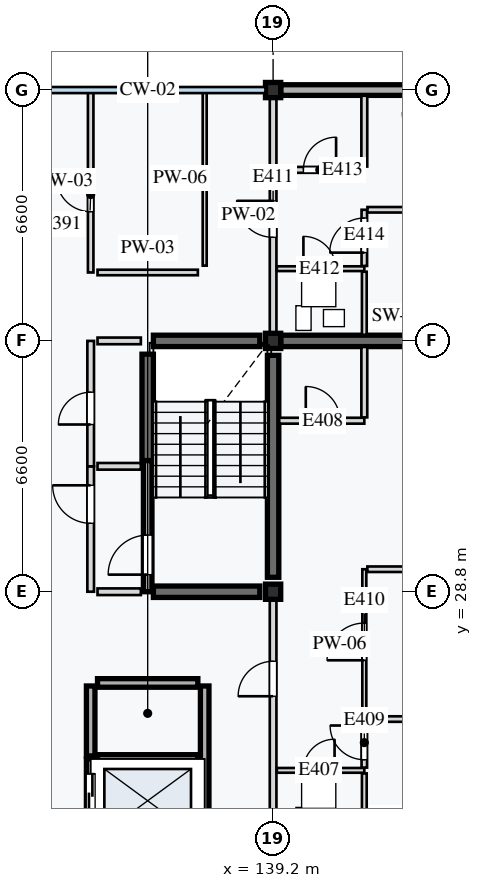
"""IFC4 building model, lengths in metres.
Left out: names, types, materials, properties, quantities, classifications, styles, units other than length and angle.
Written with IfcOpenShell. Run it as: python <this file> out.ifc"""

import sys

from ifc_helpers import new_model, si_unit, direction, frame, frame_2d, origin, origin_2d, place, context, subcontext, project, spatial, rectangle, extrude, element, fill, save


model = new_model("IFC4")
c1 = context("Model", 3, precision=1e-05, world=origin(), true_north=direction((0.0, 1.0)))
c2 = subcontext(c1, "Body", "Model", "MODEL_VIEW")
j1 = project(units=[si_unit("LENGTHUNIT", "METRE"), si_unit("PLANEANGLEUNIT", "RADIAN")], contexts=[c1])
p1 = place(None, origin())
s1 = spatial("IfcSite", under=j1, at=p1, CompositionType="ELEMENT")
p2 = place(p1, origin())
s2 = spatial("IfcBuilding", under=s1, at=p2, CompositionType="ELEMENT")
p3 = place(p2, frame((0.0, 0.0, 34.0)))
s3 = spatial("IfcBuildingStorey", under=s2, at=p3, CompositionType="ELEMENT", Elevation=34.0)
for number, where, z_axis, x_axis in (
    (1, (139.2, 28.8, 0.0), (0.0, 0.0, 1.0), (1.0, 0.0, 0.0)),
    (2, (139.2, 35.4, 0.0), (0.0, 0.0, 1.0), (1.0, 0.0, 0.0)),
    (3, (139.2, 42.0, 0.0), (0.0, 0.0, 1.0), (1.0, 0.0, 0.0)),
):
    element("IfcColumn", number, at=place(p3, frame(where, z_axis=z_axis, x_axis=x_axis)), inside=s3, PredefinedType="COLUMN", context=c2, shape_type="SweptSolid", body=[
        extrude(rectangle(XDim=0.4, YDim=0.4, at=origin_2d()), origin(), (0.0, 0.0, 1.0), 3.2),
    ])
p4 = place(p3, frame((139.2, 29.18, 0.0), z_axis=(0.0, 0.0, 1.0), x_axis=(0.0, 1.0, 0.0)))
e4 = element("IfcWall", 4, at=p4, inside=s3, PredefinedType="SHEAR", context=c2, shape_type="SweptSolid", body=[
    extrude(rectangle(XDim=5.84, YDim=0.3, at=frame_2d((2.92, 0.0))), origin(), (0.0, 0.0, 1.0), 2.97),
])
for number, where, z_axis, x_axis in (
    (5, (135.9, 32.25, 0.0), (0.0, 0.0, 1.0), (0.0, 1.0, 0.0)),
    (6, (136.05, 28.8, 0.0), (0.0, 0.0, 1.0), (1.0, 0.0, 0.0)),
    (7, (136.05, 35.4, 0.0), (0.0, 0.0, 1.0), (1.0, 0.0, 0.0)),
):
    element("IfcWall", number, at=place(p3, frame(where, z_axis=z_axis, x_axis=x_axis)), inside=s3, PredefinedType="SHEAR", context=c2, shape_type="SweptSolid", body=[
        extrude(rectangle(XDim=2.8, YDim=0.3, at=frame_2d((1.4, 0.0))), origin(), (0.0, 0.0, 1.0), 2.97),
    ])
p5 = place(p3, frame((139.4, 35.4, 0.0), z_axis=(0.0, 0.0, 1.0), x_axis=(1.0, 0.0, 0.0)))
e8 = element("IfcWall", 8, at=p5, inside=s3, PredefinedType="SHEAR", context=c2, shape_type="SweptSolid", body=[
    extrude(rectangle(XDim=6.2, YDim=0.3, at=frame_2d((3.1, 0.0))), origin(), (0.0, 0.0, 1.0), 2.97),
])
p6 = place(p3, frame((139.4, 42.0, 0.0), z_axis=(0.0, 0.0, 1.0), x_axis=(1.0, 0.0, 0.0)))
e9 = element("IfcWall", 9, at=p6, inside=s3, PredefinedType="STANDARD", context=c2, shape_type="SweptSolid", body=[
    extrude(rectangle(XDim=4.06, YDim=0.28, at=frame_2d((2.03, 0.0))), origin(), (0.0, 0.0, 1.0), 2.65),
])
p7 = place(p3, frame((134.4, 22.36, 0.0), z_axis=(0.0, 0.0, 1.0), x_axis=(0.0, 1.0, 0.0)))
e10 = element("IfcWall", 10, at=p7, inside=s3, PredefinedType="STANDARD", context=c2, shape_type="SweptSolid", body=[
    extrude(rectangle(XDim=2.04, YDim=0.225, at=frame_2d((1.02, 0.0))), origin(), (0.0, 0.0, 1.0), 2.935),
])
p8 = place(p7, frame((0.55, 0.0, 0.0)))
e11 = element("IfcOpeningElement", 11, at=p8, cuts=e10, PredefinedType="OPENING", context=c2, shape_type="SweptSolid", body=[
    extrude(rectangle(XDim=1.1, YDim=2.1, at=frame_2d((0.55, 1.05))), frame((0.0, 0.123, 0.0), z_axis=(0.0, -1.0, 0.0), x_axis=(1.0, 0.0, 0.0)), (0.0, 0.0, 1.0), 0.245),
])
p9 = place(p3, frame((134.4, 24.48, 0.0), z_axis=(0.0, 0.0, 1.0), x_axis=(0.0, 1.0, 0.0)))
e12 = element("IfcWall", 12, at=p9, inside=s3, PredefinedType="STANDARD", context=c2, shape_type="SweptSolid", body=[
    extrude(rectangle(XDim=1.84, YDim=0.225, at=frame_2d((0.92, 0.0))), origin(), (0.0, 0.0, 1.0), 2.935),
])
p10 = place(p3, frame((137.4, 22.298, 0.0), z_axis=(0.0, 0.0, 1.0), x_axis=(0.0, 1.0, 0.0)))
e13 = element("IfcWall", 13, at=p10, inside=s3, PredefinedType="STANDARD", context=c2, shape_type="SweptSolid", body=[
    extrude(rectangle(XDim=4.022, YDim=0.225, at=frame_2d((2.011, 0.0))), origin(), (0.0, 0.0, 1.0), 2.935),
])
for number, where, z_axis, x_axis in (
    (14, (134.58, 24.4, 0.0), (0.0, 0.0, 1.0), (1.0, 0.0, 0.0)),
    (15, (134.58, 26.4, 0.0), (0.0, 0.0, 1.0), (1.0, 0.0, 0.0)),
):
    element("IfcWall", number, at=place(p3, frame(where, z_axis=z_axis, x_axis=x_axis)), inside=s3, PredefinedType="STANDARD", context=c2, shape_type="SweptSolid", body=[
        extrude(rectangle(XDim=2.64, YDim=0.225, at=frame_2d((1.32, 0.0))), origin(), (0.0, 0.0, 1.0), 2.935),
    ])
p11 = place(p3, frame((135.9, 28.8, 0.0), z_axis=(0.0, 0.0, 1.0), x_axis=(0.0, 1.0, 0.0)))
e16 = element("IfcWall", 16, at=p11, inside=s3, PredefinedType="STANDARD", context=c2, shape_type="SweptSolid", body=[
    extrude(rectangle(XDim=3.45, YDim=0.225, at=frame_2d((1.725, 0.0))), origin(), (0.0, 0.0, 1.0), 2.935),
])
p12 = place(p11, frame((0.45, 0.0, 0.0)))
e17 = element("IfcOpeningElement", 17, at=p12, cuts=e16, PredefinedType="OPENING", context=c2, shape_type="SweptSolid", body=[
    extrude(rectangle(XDim=1.04, YDim=2.12, at=frame_2d((0.52, 1.06))), frame((0.0, 0.123, 0.0), z_axis=(0.0, -1.0, 0.0), x_axis=(1.0, 0.0, 0.0)), (0.0, 0.0, 1.0), 0.245),
])
p13 = place(p3, frame((134.4, 28.8, 0.0), z_axis=(0.0, 0.0, 1.0), x_axis=(0.0, 1.0, 0.0)))
e18 = element("IfcWall", 18, at=p13, inside=s3, PredefinedType="PARTITIONING", context=c2, shape_type="SweptSolid", body=[
    extrude(rectangle(XDim=3.3, YDim=0.175, at=frame_2d((1.65, 0.0))), origin(), (0.0, 0.0, 1.0), 2.935),
])
p14 = place(p13, frame((1.8, 0.0, 0.0)))
e19 = element("IfcOpeningElement", 19, at=p14, cuts=e18, PredefinedType="OPENING", context=c2, shape_type="SweptSolid", body=[
    extrude(rectangle(XDim=1.0, YDim=2.1, at=frame_2d((0.5, 1.05))), frame((0.0, 0.097, 0.0), z_axis=(0.0, -1.0, 0.0), x_axis=(1.0, 0.0, 0.0)), (0.0, 0.0, 1.0), 0.195),
])
p15 = place(p3, frame((134.4, 32.1, 0.0), z_axis=(0.0, 0.0, 1.0), x_axis=(0.0, 1.0, 0.0)))
e20 = element("IfcWall", 20, at=p15, inside=s3, PredefinedType="PARTITIONING", context=c2, shape_type="SweptSolid", body=[
    extrude(rectangle(XDim=3.3, YDim=0.175, at=frame_2d((1.65, 0.0))), origin(), (0.0, 0.0, 1.0), 2.935),
])
p16 = place(p15, frame((1.1, 0.0, 0.0)))
e21 = element("IfcOpeningElement", 21, at=p16, cuts=e20, PredefinedType="OPENING", context=c2, shape_type="SweptSolid", body=[
    extrude(rectangle(XDim=0.85, YDim=2.0, at=frame_2d((0.425, 1.0))), frame((0.0, 0.097, 0.0), z_axis=(0.0, -1.0, 0.0), x_axis=(1.0, 0.0, 0.0)), (0.0, 0.0, 1.0), 0.195),
])
for number, where, z_axis, x_axis in (
    (22, (134.58, 28.8, 0.0), (0.0, 0.0, 1.0), (1.0, 0.0, 0.0)),
    (23, (134.58, 32.1, 0.0), (0.0, 0.0, 1.0), (1.0, 0.0, 0.0)),
    (24, (134.58, 35.4, 0.0), (0.0, 0.0, 1.0), (1.0, 0.0, 0.0)),
):
    element("IfcWall", number, at=place(p3, frame(where, z_axis=z_axis, x_axis=x_axis)), inside=s3, PredefinedType="PARTITIONING", context=c2, shape_type="SweptSolid", body=[
        extrude(rectangle(XDim=1.14, YDim=0.175, at=frame_2d((0.57, 0.0))), origin(), (0.0, 0.0, 1.0), 2.935),
    ])
p17 = place(p3, frame((134.4, 37.2, 0.0), z_axis=(0.0, 0.0, 1.0), x_axis=(0.0, 1.0, 0.0)))
e25 = element("IfcWall", 25, at=p17, inside=s3, PredefinedType="PARTITIONING", context=c2, shape_type="SweptSolid", body=[
    extrude(rectangle(XDim=4.8, YDim=0.145, at=frame_2d((2.4, 0.0))), origin(), (0.0, 0.0, 1.0), 2.935),
])
p18 = place(p17, frame((1.6, 0.0, 0.0)))
e26 = element("IfcOpeningElement", 26, at=p18, cuts=e25, PredefinedType="OPENING", context=c2, shape_type="SweptSolid", body=[
    extrude(rectangle(XDim=0.9, YDim=2.16, at=frame_2d((0.45, 1.08))), frame((0.0, 0.083, 0.0), z_axis=(0.0, -1.0, 0.0), x_axis=(1.0, 0.0, 0.0)), (0.0, 0.0, 1.0), 0.165),
])
p19 = place(p3, frame((137.4, 37.38, 0.0), z_axis=(0.0, 0.0, 1.0), x_axis=(0.0, 1.0, 0.0)))
e27 = element("IfcWall", 27, at=p19, inside=s3, PredefinedType="PARTITIONING", context=c2, shape_type="SweptSolid", body=[
    extrude(rectangle(XDim=4.6, YDim=0.105, at=frame_2d((2.3, 0.0))), origin(), (0.0, 0.0, 1.0), 2.935),
])
p20 = place(p3, frame((134.58, 37.2, 0.0), z_axis=(0.0, 0.0, 1.0), x_axis=(1.0, 0.0, 0.0)))
e28 = element("IfcWall", 28, at=p20, inside=s3, PredefinedType="PARTITIONING", context=c2, shape_type="SweptSolid", body=[
    extrude(rectangle(XDim=2.64, YDim=0.145, at=frame_2d((1.32, 0.0))), origin(), (0.0, 0.0, 1.0), 2.935),
])
p21 = place(p3, frame((139.2, 22.2, 0.0), z_axis=(0.0, 0.0, 1.0), x_axis=(0.0, 1.0, 0.0)))
e29 = element("IfcWall", 29, at=p21, inside=s3, PredefinedType="PARTITIONING", context=c2, shape_type="SweptSolid", body=[
    extrude(rectangle(XDim=6.6, YDim=0.175, at=frame_2d((3.3, 0.0))), origin(), (0.0, 0.0, 1.0), 2.7),
])
p22 = place(p21, frame((3.85, 0.0, 0.0)))
e30 = element("IfcOpeningElement", 30, at=p22, cuts=e29, PredefinedType="OPENING", context=c2, shape_type="SweptSolid", body=[
    extrude(rectangle(XDim=0.92, YDim=2.14, at=frame_2d((0.46, 1.07))), frame((0.0, 0.097, 0.0), z_axis=(0.0, -1.0, 0.0), x_axis=(1.0, 0.0, 0.0)), (0.0, 0.0, 1.0), 0.195),
])
p23 = place(p3, frame((139.298, 24.1, 0.0), z_axis=(0.0, 0.0, 1.0), x_axis=(1.0, 0.0, 0.0)))
e31 = element("IfcWall", 31, at=p23, inside=s3, PredefinedType="PARTITIONING", context=c2, shape_type="SweptSolid", body=[
    extrude(rectangle(XDim=2.302, YDim=0.125, at=frame_2d((1.151, 0.0))), origin(), (0.0, 0.0, 1.0), 2.935),
])
p24 = place(p23, frame((0.7, 0.0, 0.0)))
e32 = element("IfcOpeningElement", 32, at=p24, cuts=e31, PredefinedType="OPENING", context=c2, shape_type="SweptSolid", body=[
    extrude(rectangle(XDim=0.82, YDim=2.05, at=frame_2d((0.41, 1.025))), frame((0.0, 0.073, 0.0), z_axis=(0.0, -1.0, 0.0), x_axis=(1.0, 0.0, 0.0)), (0.0, 0.0, 1.0), 0.145),
])
p25 = place(p3, frame((141.6, 22.36, 0.0), z_axis=(0.0, 0.0, 1.0), x_axis=(0.0, 1.0, 0.0)))
e33 = element("IfcWall", 33, at=p25, inside=s3, PredefinedType="PARTITIONING", context=c2, shape_type="SweptSolid", body=[
    extrude(rectangle(XDim=1.66, YDim=0.125, at=frame_2d((0.83, 0.0))), origin(), (0.0, 0.0, 1.0), 2.935),
])
p26 = place(p3, frame((139.36, 33.3, 0.0), z_axis=(0.0, 0.0, 1.0), x_axis=(1.0, 0.0, 0.0)))
e34 = element("IfcWall", 34, at=p26, inside=s3, PredefinedType="PARTITIONING", context=c2, shape_type="SweptSolid", body=[
    extrude(rectangle(XDim=2.24, YDim=0.155, at=frame_2d((1.12, 0.0))), origin(), (0.0, 0.0, 1.0), 2.935),
])
p27 = place(p26, frame((0.7, 0.0, 0.0)))
e35 = element("IfcOpeningElement", 35, at=p27, cuts=e34, PredefinedType="OPENING", context=c2, shape_type="SweptSolid", body=[
    extrude(rectangle(XDim=0.9, YDim=2.1, at=frame_2d((0.45, 1.05))), frame((0.0, 0.087, 0.0), z_axis=(0.0, -1.0, 0.0), x_axis=(1.0, 0.0, 0.0)), (0.0, 0.0, 1.0), 0.175),
])
p28 = place(p3, frame((141.6, 33.387, 0.0), z_axis=(0.0, 0.0, 1.0), x_axis=(0.0, 1.0, 0.0)))
e36 = element("IfcWall", 36, at=p28, inside=s3, PredefinedType="PARTITIONING", context=c2, shape_type="SweptSolid", body=[
    extrude(rectangle(XDim=1.853, YDim=0.155, at=frame_2d((0.926, 0.0))), origin(), (0.0, 0.0, 1.0), 2.935),
])
p29 = place(p3, frame((141.6, 24.173, 0.0), z_axis=(0.0, 0.0, 1.0), x_axis=(0.0, 1.0, 0.0)))
e37 = element("IfcWall", 37, at=p29, inside=s3, PredefinedType="PARTITIONING", context=c2, shape_type="SweptSolid", body=[
    extrude(rectangle(XDim=1.277, YDim=0.145, at=frame_2d((0.639, 0.0))), origin(), (0.0, 0.0, 1.0), 2.935),
])
p30 = place(p29, frame((0.208, 0.0, 0.0)))
e38 = element("IfcOpeningElement", 38, at=p30, cuts=e37, PredefinedType="OPENING", context=c2, shape_type="SweptSolid", body=[
    extrude(rectangle(XDim=0.9, YDim=2.16, at=frame_2d((0.45, 1.08))), frame((0.0, 0.083, 0.0), z_axis=(0.0, -1.0, 0.0), x_axis=(1.0, 0.0, 0.0)), (0.0, 0.0, 1.0), 0.165),
])
p31 = place(p3, frame((141.683, 25.45, 0.0), z_axis=(0.0, 0.0, 1.0), x_axis=(1.0, 0.0, 0.0)))
e39 = element("IfcWall", 39, at=p31, inside=s3, PredefinedType="PARTITIONING", context=c2, shape_type="SweptSolid", body=[
    extrude(rectangle(XDim=3.967, YDim=0.145, at=frame_2d((1.984, 0.0))), origin(), (0.0, 0.0, 1.0), 2.935),
])
p32 = place(p3, frame((141.6, 25.45, 0.0), z_axis=(0.0, 0.0, 1.0), x_axis=(0.0, 1.0, 0.0)))
e40 = element("IfcWall", 40, at=p32, inside=s3, PredefinedType="PARTITIONING", context=c2, shape_type="SweptSolid", body=[
    extrude(rectangle(XDim=3.942, YDim=0.105, at=frame_2d((1.971, 0.0))), origin(), (0.0, 0.0, 1.0), 2.935),
])
p33 = place(p32, frame((1.546, 0.0, 0.0)))
e41 = element("IfcOpeningElement", 41, at=p33, cuts=e40, PredefinedType="OPENING", context=c2, shape_type="SweptSolid", body=[
    extrude(rectangle(XDim=0.98, YDim=2.12, at=frame_2d((0.49, 1.06))), frame((0.0, 0.062, 0.0), z_axis=(0.0, -1.0, 0.0), x_axis=(1.0, 0.0, 0.0)), (0.0, 0.0, 1.0), 0.125),
])
p34 = place(p3, frame((141.68, 29.392, 0.0), z_axis=(0.0, 0.0, 1.0), x_axis=(1.0, 0.0, 0.0)))
e42 = element("IfcWall", 42, at=p34, inside=s3, PredefinedType="PARTITIONING", context=c2, shape_type="SweptSolid", body=[
    extrude(rectangle(XDim=3.97, YDim=0.145, at=frame_2d((1.985, 0.0))), origin(), (0.0, 0.0, 1.0), 2.935),
])
p35 = place(p3, frame((139.2, 35.4, 0.0), z_axis=(0.0, 0.0, 1.0), x_axis=(0.0, 1.0, 0.0)))
e43 = element("IfcWall", 43, at=p35, inside=s3, PredefinedType="PARTITIONING", context=c2, shape_type="SweptSolid", body=[
    extrude(rectangle(XDim=6.6, YDim=0.175, at=frame_2d((3.3, 0.0))), origin(), (0.0, 0.0, 1.0), 2.7),
])
p36 = place(p35, frame((2.725, 0.0, 0.0)))
e44 = element("IfcOpeningElement", 44, at=p36, cuts=e43, PredefinedType="OPENING", context=c2, shape_type="SweptSolid", body=[
    extrude(rectangle(XDim=0.96, YDim=2.18, at=frame_2d((0.48, 1.09))), frame((0.0, 0.097, 0.0), z_axis=(0.0, -1.0, 0.0), x_axis=(1.0, 0.0, 0.0)), (0.0, 0.0, 1.0), 0.195),
])
p37 = place(p3, frame((139.298, 37.3, 0.0), z_axis=(0.0, 0.0, 1.0), x_axis=(1.0, 0.0, 0.0)))
e45 = element("IfcWall", 45, at=p37, inside=s3, PredefinedType="PARTITIONING", context=c2, shape_type="SweptSolid", body=[
    extrude(rectangle(XDim=2.302, YDim=0.125, at=frame_2d((1.151, 0.0))), origin(), (0.0, 0.0, 1.0), 2.935),
])
p38 = place(p37, frame((0.7, 0.0, 0.0)))
e46 = element("IfcOpeningElement", 46, at=p38, cuts=e45, PredefinedType="OPENING", context=c2, shape_type="SweptSolid", body=[
    extrude(rectangle(XDim=0.85, YDim=2.04, at=frame_2d((0.425, 1.02))), frame((0.0, 0.073, 0.0), z_axis=(0.0, -1.0, 0.0), x_axis=(1.0, 0.0, 0.0)), (0.0, 0.0, 1.0), 0.145),
])
p39 = place(p3, frame((141.6, 35.56, 0.0), z_axis=(0.0, 0.0, 1.0), x_axis=(0.0, 1.0, 0.0)))
e47 = element("IfcWall", 47, at=p39, inside=s3, PredefinedType="PARTITIONING", context=c2, shape_type="SweptSolid", body=[
    extrude(rectangle(XDim=1.66, YDim=0.125, at=frame_2d((0.83, 0.0))), origin(), (0.0, 0.0, 1.0), 2.935),
])
p40 = place(p3, frame((139.298, 39.9, 0.0), z_axis=(0.0, 0.0, 1.0), x_axis=(1.0, 0.0, 0.0)))
e48 = element("IfcWall", 48, at=p40, inside=s3, PredefinedType="PARTITIONING", context=c2, shape_type="SweptSolid", body=[
    extrude(rectangle(XDim=2.302, YDim=0.155, at=frame_2d((1.151, 0.0))), origin(), (0.0, 0.0, 1.0), 2.935),
])
p41 = place(p40, frame((0.7, 0.0, 0.0)))
e49 = element("IfcOpeningElement", 49, at=p41, cuts=e48, PredefinedType="OPENING", context=c2, shape_type="SweptSolid", body=[
    extrude(rectangle(XDim=0.86, YDim=2.12, at=frame_2d((0.43, 1.06))), frame((0.0, 0.087, 0.0), z_axis=(0.0, -1.0, 0.0), x_axis=(1.0, 0.0, 0.0)), (0.0, 0.0, 1.0), 0.175),
])
p42 = place(p3, frame((141.6, 39.988, 0.0), z_axis=(0.0, 0.0, 1.0), x_axis=(0.0, 1.0, 0.0)))
e50 = element("IfcWall", 50, at=p42, inside=s3, PredefinedType="PARTITIONING", context=c2, shape_type="SweptSolid", body=[
    extrude(rectangle(XDim=1.863, YDim=0.155, at=frame_2d((0.931, 0.0))), origin(), (0.0, 0.0, 1.0), 2.935),
])
p43 = place(p3, frame((141.6, 37.373, 0.0), z_axis=(0.0, 0.0, 1.0), x_axis=(0.0, 1.0, 0.0)))
e51 = element("IfcWall", 51, at=p43, inside=s3, PredefinedType="PARTITIONING", context=c2, shape_type="SweptSolid", body=[
    extrude(rectangle(XDim=1.478, YDim=0.145, at=frame_2d((0.739, 0.0))), origin(), (0.0, 0.0, 1.0), 2.935),
])
p44 = place(p43, frame((0.35, 0.0, 0.0)))
e52 = element("IfcOpeningElement", 52, at=p44, cuts=e51, PredefinedType="OPENING", context=c2, shape_type="SweptSolid", body=[
    extrude(rectangle(XDim=0.91, YDim=2.14, at=frame_2d((0.455, 1.07))), frame((0.0, 0.083, 0.0), z_axis=(0.0, -1.0, 0.0), x_axis=(1.0, 0.0, 0.0)), (0.0, 0.0, 1.0), 0.165),
])
p45 = place(p3, frame((141.683, 38.85, 0.0), z_axis=(0.0, 0.0, 1.0), x_axis=(1.0, 0.0, 0.0)))
e53 = element("IfcWall", 53, at=p45, inside=s3, PredefinedType="PARTITIONING", context=c2, shape_type="SweptSolid", body=[
    extrude(rectangle(XDim=3.967, YDim=0.145, at=frame_2d((1.984, 0.0))), origin(), (0.0, 0.0, 1.0), 2.935),
])
p46 = place(p8, origin())
e54 = element("IfcDoor", 54, at=p46, inside=s3, OperationType="DOUBLE_DOOR_SLIDING", PredefinedType="DOOR", context=c2, shape_type="SweptSolid", body=[
    extrude(rectangle(XDim=1.1, YDim=2.1, at=frame_2d((0.55, 1.05))), frame((0.0, 0.025, 0.0), z_axis=(0.0, -1.0, 0.0), x_axis=(1.0, 0.0, 0.0)), (0.0, 0.0, 1.0), 0.05),
])
fill(e11, e54)
p47 = place(p12, origin())
e55 = element("IfcDoor", 55, at=p47, inside=s3, OperationType="SINGLE_SWING_LEFT", PredefinedType="DOOR", context=c2, shape_type="SweptSolid", body=[
    extrude(rectangle(XDim=1.04, YDim=2.12, at=frame_2d((0.52, 1.06))), frame((0.0, 0.025, 0.0), z_axis=(0.0, -1.0, 0.0), x_axis=(1.0, 0.0, 0.0)), (0.0, 0.0, 1.0), 0.05),
])
fill(e17, e55)
p48 = place(p14, origin())
e56 = element("IfcDoor", 56, at=p48, inside=s3, OperationType="SINGLE_SWING_RIGHT", PredefinedType="DOOR", context=c2, shape_type="SweptSolid", body=[
    extrude(rectangle(XDim=1.0, YDim=2.1, at=frame_2d((0.5, 1.05))), frame((0.0, 0.025, 0.0), z_axis=(0.0, -1.0, 0.0), x_axis=(1.0, 0.0, 0.0)), (0.0, 0.0, 1.0), 0.05),
])
fill(e19, e56)
p49 = place(p16, origin())
e57 = element("IfcDoor", 57, at=p49, inside=s3, OperationType="SINGLE_SWING_LEFT", PredefinedType="DOOR", context=c2, shape_type="SweptSolid", body=[
    extrude(rectangle(XDim=0.85, YDim=2.0, at=frame_2d((0.425, 1.0))), frame((0.0, 0.025, 0.0), z_axis=(0.0, -1.0, 0.0), x_axis=(1.0, 0.0, 0.0)), (0.0, 0.0, 1.0), 0.05),
])
fill(e21, e57)
p50 = place(p18, origin())
e58 = element("IfcDoor", 58, at=p50, inside=s3, OperationType="SINGLE_SWING_RIGHT", PredefinedType="DOOR", context=c2, shape_type="SweptSolid", body=[
    extrude(rectangle(XDim=0.9, YDim=2.16, at=frame_2d((0.45, 1.08))), frame((0.0, 0.025, 0.0), z_axis=(0.0, -1.0, 0.0), x_axis=(1.0, 0.0, 0.0)), (0.0, 0.0, 1.0), 0.05),
])
fill(e26, e58)
p51 = place(p22, origin())
e59 = element("IfcDoor", 59, at=p51, inside=s3, OperationType="SINGLE_SWING_LEFT", PredefinedType="DOOR", context=c2, shape_type="SweptSolid", body=[
    extrude(rectangle(XDim=0.92, YDim=2.14, at=frame_2d((0.46, 1.07))), frame((0.0, 0.025, 0.0), z_axis=(0.0, -1.0, 0.0), x_axis=(1.0, 0.0, 0.0)), (0.0, 0.0, 1.0), 0.05),
])
fill(e30, e59)
p52 = place(p24, origin())
e60 = element("IfcDoor", 60, at=p52, inside=s3, OperationType="SINGLE_SWING_RIGHT", PredefinedType="DOOR", context=c2, shape_type="SweptSolid", body=[
    extrude(rectangle(XDim=0.82, YDim=2.05, at=frame_2d((0.41, 1.025))), frame((0.0, 0.025, 0.0), z_axis=(0.0, -1.0, 0.0), x_axis=(1.0, 0.0, 0.0)), (0.0, 0.0, 1.0), 0.05),
])
fill(e32, e60)
p53 = place(p27, origin())
e61 = element("IfcDoor", 61, at=p53, inside=s3, OperationType="SINGLE_SWING_LEFT", PredefinedType="DOOR", context=c2, shape_type="SweptSolid", body=[
    extrude(rectangle(XDim=0.9, YDim=2.1, at=frame_2d((0.45, 1.05))), frame((0.0, 0.025, 0.0), z_axis=(0.0, -1.0, 0.0), x_axis=(1.0, 0.0, 0.0)), (0.0, 0.0, 1.0), 0.05),
])
fill(e35, e61)
p54 = place(p30, origin())
e62 = element("IfcDoor", 62, at=p54, inside=s3, OperationType="SINGLE_SWING_RIGHT", PredefinedType="DOOR", context=c2, shape_type="SweptSolid", body=[
    extrude(rectangle(XDim=0.9, YDim=2.16, at=frame_2d((0.45, 1.08))), frame((0.0, 0.025, 0.0), z_axis=(0.0, -1.0, 0.0), x_axis=(1.0, 0.0, 0.0)), (0.0, 0.0, 1.0), 0.05),
])
fill(e38, e62)
p55 = place(p33, origin())
e63 = element("IfcDoor", 63, at=p55, inside=s3, OperationType="SINGLE_SWING_LEFT", PredefinedType="DOOR", context=c2, shape_type="SweptSolid", body=[
    extrude(rectangle(XDim=0.98, YDim=2.12, at=frame_2d((0.49, 1.06))), frame((0.0, 0.025, 0.0), z_axis=(0.0, -1.0, 0.0), x_axis=(1.0, 0.0, 0.0)), (0.0, 0.0, 1.0), 0.05),
])
fill(e41, e63)
p56 = place(p36, origin())
e64 = element("IfcDoor", 64, at=p56, inside=s3, OperationType="SINGLE_SWING_RIGHT", PredefinedType="DOOR", context=c2, shape_type="SweptSolid", body=[
    extrude(rectangle(XDim=0.96, YDim=2.18, at=frame_2d((0.48, 1.09))), frame((0.0, 0.025, 0.0), z_axis=(0.0, -1.0, 0.0), x_axis=(1.0, 0.0, 0.0)), (0.0, 0.0, 1.0), 0.05),
])
fill(e44, e64)
p57 = place(p38, origin())
e65 = element("IfcDoor", 65, at=p57, inside=s3, OperationType="SINGLE_SWING_LEFT", PredefinedType="DOOR", context=c2, shape_type="SweptSolid", body=[
    extrude(rectangle(XDim=0.85, YDim=2.04, at=frame_2d((0.425, 1.02))), frame((0.0, 0.025, 0.0), z_axis=(0.0, -1.0, 0.0), x_axis=(1.0, 0.0, 0.0)), (0.0, 0.0, 1.0), 0.05),
])
fill(e46, e65)
p58 = place(p41, origin())
e66 = element("IfcDoor", 66, at=p58, inside=s3, OperationType="SINGLE_SWING_RIGHT", PredefinedType="DOOR", context=c2, shape_type="SweptSolid", body=[
    extrude(rectangle(XDim=0.86, YDim=2.12, at=frame_2d((0.43, 1.06))), frame((0.0, 0.025, 0.0), z_axis=(0.0, -1.0, 0.0), x_axis=(1.0, 0.0, 0.0)), (0.0, 0.0, 1.0), 0.05),
])
fill(e49, e66)
p59 = place(p44, origin())
e67 = element("IfcDoor", 67, at=p59, inside=s3, OperationType="SINGLE_SWING_LEFT", PredefinedType="DOOR", context=c2, shape_type="SweptSolid", body=[
    extrude(rectangle(XDim=0.91, YDim=2.14, at=frame_2d((0.455, 1.07))), frame((0.0, 0.025, 0.0), z_axis=(0.0, -1.0, 0.0), x_axis=(1.0, 0.0, 0.0)), (0.0, 0.0, 1.0), 0.05),
])
fill(e52, e67)
save(model, sys.argv[1])
